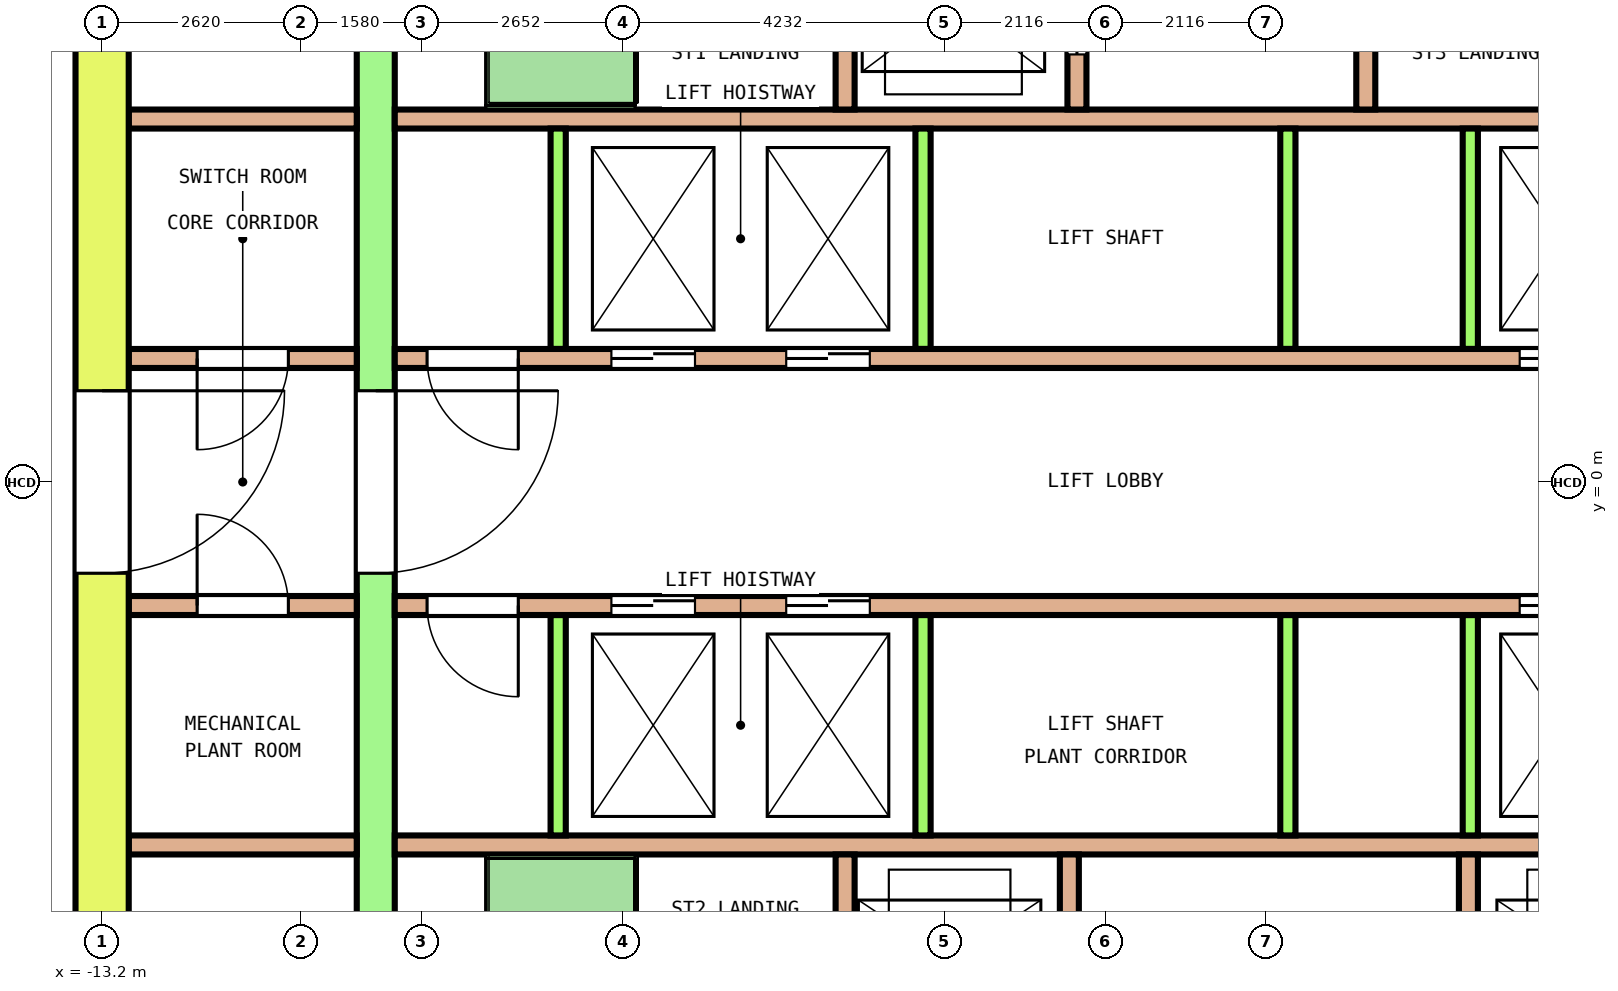
"""IFC4 building model, lengths in metres.
Left out: names, types, materials, properties, quantities, classifications, styles, units other than length and angle.
Written with IfcOpenShell. Run it as: python <this file> out.ifc"""

import sys

from ifc_helpers import new_model, si_unit, direction, frame, frame_2d, origin, place, context, subcontext, project, spatial, rectangle, extrude, element, fill, save


model = new_model("IFC4")
c1 = context("Model", 3, precision=1e-05, world=origin(), true_north=direction((0.0, 1.0)))
c2 = subcontext(c1, "Body", "Model", "MODEL_VIEW")
j1 = project(units=[si_unit("LENGTHUNIT", "METRE"), si_unit("PLANEANGLEUNIT", "RADIAN")], contexts=[c1])
p1 = place(None, origin())
s1 = spatial("IfcSite", under=j1, at=p1, CompositionType="ELEMENT")
p2 = place(p1, origin())
s2 = spatial("IfcBuilding", under=s1, at=p2, CompositionType="ELEMENT")
p3 = place(p2, frame((0.0, 0.0, 139.6)))
s3 = spatial("IfcBuildingStorey", under=s2, at=p3, CompositionType="ELEMENT", Elevation=139.6)
p4 = place(p3, frame((-13.2, -7.75, 0.0), z_axis=(0.0, 0.0, 1.0), x_axis=(0.0, 1.0, 0.0)))
e1 = element("IfcWall", 1, at=p4, inside=s3, PredefinedType="SHEAR", context=c2, shape_type="SweptSolid", body=[
    extrude(rectangle(XDim=15.5, YDim=0.7, at=frame_2d((7.75, 0.0))), origin(), (0.0, 0.0, 1.0), 5.3),
])
p5 = place(p4, frame((6.55, 0.0, 0.0)))
e2 = element("IfcOpeningElement", 2, at=p5, cuts=e1, PredefinedType="OPENING", context=c2, shape_type="SweptSolid", body=[
    extrude(rectangle(XDim=2.4, YDim=2.1, at=frame_2d((1.2, 1.05))), frame((0.0, 0.36, 0.0), z_axis=(0.0, -1.0, 0.0), x_axis=(1.0, 0.0, 0.0)), (0.0, 0.0, 1.0), 0.72),
])
p6 = place(p4, frame((13.45, 0.0, 0.0)))
e3 = element("IfcOpeningElement", 3, at=p6, cuts=e1, PredefinedType="OPENING", context=c2, shape_type="SweptSolid", body=[
    extrude(rectangle(XDim=1.2, YDim=2.1, at=frame_2d((0.6, 1.05))), frame((0.0, 0.36, 0.0), z_axis=(0.0, -1.0, 0.0), x_axis=(1.0, 0.0, 0.0)), (0.0, 0.0, 1.0), 0.72),
])
p7 = place(p4, frame((0.85, 0.0, 0.0)))
e4 = element("IfcOpeningElement", 4, at=p7, cuts=e1, PredefinedType="OPENING", context=c2, shape_type="SweptSolid", body=[
    extrude(rectangle(XDim=1.2, YDim=2.1, at=frame_2d((0.6, 1.05))), frame((0.0, 0.36, 0.0), z_axis=(0.0, -1.0, 0.0), x_axis=(1.0, 0.0, 0.0)), (0.0, 0.0, 1.0), 0.72),
])
p8 = place(p3, frame((-9.6, -7.75, 0.0), z_axis=(0.0, 0.0, 1.0), x_axis=(0.0, 1.0, 0.0)))
e5 = element("IfcWall", 5, at=p8, inside=s3, PredefinedType="SHEAR", context=c2, shape_type="SweptSolid", body=[
    extrude(rectangle(XDim=15.5, YDim=0.5, at=frame_2d((7.75, 0.0))), origin(), (0.0, 0.0, 1.0), 5.3),
])
p9 = place(p8, frame((6.55, 0.0, 0.0)))
e6 = element("IfcOpeningElement", 6, at=p9, cuts=e5, PredefinedType="OPENING", context=c2, shape_type="SweptSolid", body=[
    extrude(rectangle(XDim=2.4, YDim=2.1, at=frame_2d((1.2, 1.05))), frame((0.0, 0.26, 0.0), z_axis=(0.0, -1.0, 0.0), x_axis=(1.0, 0.0, 0.0)), (0.0, 0.0, 1.0), 0.52),
])
p10 = place(p8, frame((13.45, 0.0, 0.0)))
e7 = element("IfcOpeningElement", 7, at=p10, cuts=e5, PredefinedType="OPENING", context=c2, shape_type="SweptSolid", body=[
    extrude(rectangle(XDim=1.2, YDim=2.1, at=frame_2d((0.6, 1.05))), frame((0.0, 0.26, 0.0), z_axis=(0.0, -1.0, 0.0), x_axis=(1.0, 0.0, 0.0)), (0.0, 0.0, 1.0), 0.52),
])
p11 = place(p8, frame((0.85, 0.0, 0.0)))
e8 = element("IfcOpeningElement", 8, at=p11, cuts=e5, PredefinedType="OPENING", context=c2, shape_type="SweptSolid", body=[
    extrude(rectangle(XDim=1.2, YDim=2.1, at=frame_2d((0.6, 1.05))), frame((0.0, 0.26, 0.0), z_axis=(0.0, -1.0, 0.0), x_axis=(1.0, 0.0, 0.0)), (0.0, 0.0, 1.0), 0.52),
])
p12 = place(p3, frame((-12.85, 1.625, 0.0), z_axis=(0.0, 0.0, 1.0), x_axis=(1.0, 0.0, 0.0)))
e9 = element("IfcWall", 9, at=p12, inside=s3, PredefinedType="SOLIDWALL", context=c2, shape_type="SweptSolid", body=[
    extrude(rectangle(XDim=3.0, YDim=0.25, at=frame_2d((1.5, 0.0))), origin(), (0.0, 0.0, 1.0), 5.3),
])
p13 = place(p12, frame((0.9, 0.0, 0.0)))
e10 = element("IfcOpeningElement", 10, at=p13, cuts=e9, PredefinedType="OPENING", context=c2, shape_type="SweptSolid", body=[
    extrude(rectangle(XDim=1.2, YDim=2.1, at=frame_2d((0.6, 1.05))), frame((0.0, 0.135, 0.0), z_axis=(0.0, -1.0, 0.0), x_axis=(1.0, 0.0, 0.0)), (0.0, 0.0, 1.0), 0.27),
])
p14 = place(p3, frame((-9.35, 1.625, 0.0), z_axis=(0.0, 0.0, 1.0), x_axis=(1.0, 0.0, 0.0)))
e11 = element("IfcWall", 11, at=p14, inside=s3, PredefinedType="SOLIDWALL", context=c2, shape_type="SweptSolid", body=[
    extrude(rectangle(XDim=18.7, YDim=0.25, at=frame_2d((9.35, 0.0))), origin(), (0.0, 0.0, 1.0), 5.3),
])
p15 = place(p14, frame((2.85, 0.0, 0.0)))
e12 = element("IfcOpeningElement", 12, at=p15, cuts=e11, PredefinedType="OPENING", context=c2, shape_type="SweptSolid", body=[
    extrude(rectangle(XDim=1.1, YDim=2.1, at=frame_2d((0.55, 1.05))), frame((0.0, 0.135, 0.0), z_axis=(0.0, -1.0, 0.0), x_axis=(1.0, 0.0, 0.0)), (0.0, 0.0, 1.0), 0.27),
])
p16 = place(p14, frame((5.15, 0.0, 0.0)))
e13 = element("IfcOpeningElement", 13, at=p16, cuts=e11, PredefinedType="OPENING", context=c2, shape_type="SweptSolid", body=[
    extrude(rectangle(XDim=1.1, YDim=2.1, at=frame_2d((0.55, 1.05))), frame((0.0, 0.135, 0.0), z_axis=(0.0, -1.0, 0.0), x_axis=(1.0, 0.0, 0.0)), (0.0, 0.0, 1.0), 0.27),
])
p17 = place(p14, frame((14.8, 0.0, 0.0)))
e14 = element("IfcOpeningElement", 14, at=p17, cuts=e11, PredefinedType="OPENING", context=c2, shape_type="SweptSolid", body=[
    extrude(rectangle(XDim=1.1, YDim=2.1, at=frame_2d((0.55, 1.05))), frame((0.0, 0.135, 0.0), z_axis=(0.0, -1.0, 0.0), x_axis=(1.0, 0.0, 0.0)), (0.0, 0.0, 1.0), 0.27),
])
p18 = place(p14, frame((0.425, 0.0, 0.0)))
e15 = element("IfcOpeningElement", 15, at=p18, cuts=e11, PredefinedType="OPENING", context=c2, shape_type="SweptSolid", body=[
    extrude(rectangle(XDim=1.2, YDim=2.1, at=frame_2d((0.6, 1.05))), frame((0.0, 0.135, 0.0), z_axis=(0.0, -1.0, 0.0), x_axis=(1.0, 0.0, 0.0)), (0.0, 0.0, 1.0), 0.27),
])
p19 = place(p14, frame((17.075, 0.0, 0.0)))
e16 = element("IfcOpeningElement", 16, at=p19, cuts=e11, PredefinedType="OPENING", context=c2, shape_type="SweptSolid", body=[
    extrude(rectangle(XDim=1.2, YDim=2.1, at=frame_2d((0.6, 1.05))), frame((0.0, 0.135, 0.0), z_axis=(0.0, -1.0, 0.0), x_axis=(1.0, 0.0, 0.0)), (0.0, 0.0, 1.0), 0.27),
])
p20 = place(p3, frame((-12.85, 4.775, 0.0), z_axis=(0.0, 0.0, 1.0), x_axis=(1.0, 0.0, 0.0)))
e17 = element("IfcWall", 17, at=p20, inside=s3, PredefinedType="SOLIDWALL", context=c2, shape_type="SweptSolid", body=[
    extrude(rectangle(XDim=3.0, YDim=0.25, at=frame_2d((1.5, 0.0))), origin(), (0.0, 0.0, 1.0), 5.3),
])
p21 = place(p3, frame((-9.35, 4.775, 0.0), z_axis=(0.0, 0.0, 1.0), x_axis=(1.0, 0.0, 0.0)))
e18 = element("IfcWall", 18, at=p21, inside=s3, PredefinedType="SOLIDWALL", context=c2, shape_type="SweptSolid", body=[
    extrude(rectangle(XDim=18.7, YDim=0.25, at=frame_2d((9.35, 0.0))), origin(), (0.0, 0.0, 1.0), 5.3),
])
for number, where, z_axis, x_axis in (
    (19, (-7.2, 1.75, 0.0), (0.0, 0.0, 1.0), (0.0, 1.0, 0.0)),
    (20, (-2.4, 1.75, 0.0), (0.0, 0.0, 1.0), (0.0, 1.0, 0.0)),
    (21, (2.4, 1.75, 0.0), (0.0, 0.0, 1.0), (0.0, 1.0, 0.0)),
    (22, (4.8, 1.75, 0.0), (0.0, 0.0, 1.0), (0.0, 1.0, 0.0)),
):
    element("IfcWall", number, at=place(p3, frame(where, z_axis=z_axis, x_axis=x_axis)), inside=s3, PredefinedType="SOLIDWALL", context=c2, shape_type="SweptSolid", body=[
        extrude(rectangle(XDim=2.9, YDim=0.2, at=frame_2d((1.45, 0.0))), origin(), (0.0, 0.0, 1.0), 5.3),
    ])
p22 = place(p3, frame((-12.85, -1.625, 0.0), z_axis=(0.0, 0.0, 1.0), x_axis=(1.0, 0.0, 0.0)))
e23 = element("IfcWall", 23, at=p22, inside=s3, PredefinedType="SOLIDWALL", context=c2, shape_type="SweptSolid", body=[
    extrude(rectangle(XDim=3.0, YDim=0.25, at=frame_2d((1.5, 0.0))), origin(), (0.0, 0.0, 1.0), 5.3),
])
p23 = place(p22, frame((0.9, 0.0, 0.0)))
e24 = element("IfcOpeningElement", 24, at=p23, cuts=e23, PredefinedType="OPENING", context=c2, shape_type="SweptSolid", body=[
    extrude(rectangle(XDim=1.2, YDim=2.1, at=frame_2d((0.6, 1.05))), frame((0.0, 0.135, 0.0), z_axis=(0.0, -1.0, 0.0), x_axis=(1.0, 0.0, 0.0)), (0.0, 0.0, 1.0), 0.27),
])
p24 = place(p3, frame((-9.35, -1.625, 0.0), z_axis=(0.0, 0.0, 1.0), x_axis=(1.0, 0.0, 0.0)))
e25 = element("IfcWall", 25, at=p24, inside=s3, PredefinedType="SOLIDWALL", context=c2, shape_type="SweptSolid", body=[
    extrude(rectangle(XDim=18.7, YDim=0.25, at=frame_2d((9.35, 0.0))), origin(), (0.0, 0.0, 1.0), 5.3),
])
p25 = place(p24, frame((2.85, 0.0, 0.0)))
e26 = element("IfcOpeningElement", 26, at=p25, cuts=e25, PredefinedType="OPENING", context=c2, shape_type="SweptSolid", body=[
    extrude(rectangle(XDim=1.1, YDim=2.1, at=frame_2d((0.55, 1.05))), frame((0.0, 0.135, 0.0), z_axis=(0.0, -1.0, 0.0), x_axis=(1.0, 0.0, 0.0)), (0.0, 0.0, 1.0), 0.27),
])
p26 = place(p24, frame((5.15, 0.0, 0.0)))
e27 = element("IfcOpeningElement", 27, at=p26, cuts=e25, PredefinedType="OPENING", context=c2, shape_type="SweptSolid", body=[
    extrude(rectangle(XDim=1.1, YDim=2.1, at=frame_2d((0.55, 1.05))), frame((0.0, 0.135, 0.0), z_axis=(0.0, -1.0, 0.0), x_axis=(1.0, 0.0, 0.0)), (0.0, 0.0, 1.0), 0.27),
])
p27 = place(p24, frame((14.8, 0.0, 0.0)))
e28 = element("IfcOpeningElement", 28, at=p27, cuts=e25, PredefinedType="OPENING", context=c2, shape_type="SweptSolid", body=[
    extrude(rectangle(XDim=1.1, YDim=2.1, at=frame_2d((0.55, 1.05))), frame((0.0, 0.135, 0.0), z_axis=(0.0, -1.0, 0.0), x_axis=(1.0, 0.0, 0.0)), (0.0, 0.0, 1.0), 0.27),
])
p28 = place(p24, frame((0.425, 0.0, 0.0)))
e29 = element("IfcOpeningElement", 29, at=p28, cuts=e25, PredefinedType="OPENING", context=c2, shape_type="SweptSolid", body=[
    extrude(rectangle(XDim=1.2, YDim=2.1, at=frame_2d((0.6, 1.05))), frame((0.0, 0.135, 0.0), z_axis=(0.0, -1.0, 0.0), x_axis=(1.0, 0.0, 0.0)), (0.0, 0.0, 1.0), 0.27),
])
p29 = place(p24, frame((17.075, 0.0, 0.0)))
e30 = element("IfcOpeningElement", 30, at=p29, cuts=e25, PredefinedType="OPENING", context=c2, shape_type="SweptSolid", body=[
    extrude(rectangle(XDim=1.2, YDim=2.1, at=frame_2d((0.6, 1.05))), frame((0.0, 0.135, 0.0), z_axis=(0.0, -1.0, 0.0), x_axis=(1.0, 0.0, 0.0)), (0.0, 0.0, 1.0), 0.27),
])
p30 = place(p3, frame((-12.85, -4.775, 0.0), z_axis=(0.0, 0.0, 1.0), x_axis=(1.0, 0.0, 0.0)))
e31 = element("IfcWall", 31, at=p30, inside=s3, PredefinedType="SOLIDWALL", context=c2, shape_type="SweptSolid", body=[
    extrude(rectangle(XDim=3.0, YDim=0.25, at=frame_2d((1.5, 0.0))), origin(), (0.0, 0.0, 1.0), 5.3),
])
p31 = place(p3, frame((-9.35, -4.775, 0.0), z_axis=(0.0, 0.0, 1.0), x_axis=(1.0, 0.0, 0.0)))
e32 = element("IfcWall", 32, at=p31, inside=s3, PredefinedType="SOLIDWALL", context=c2, shape_type="SweptSolid", body=[
    extrude(rectangle(XDim=18.7, YDim=0.25, at=frame_2d((9.35, 0.0))), origin(), (0.0, 0.0, 1.0), 5.3),
])
for number, where, z_axis, x_axis in (
    (33, (-7.2, -4.65, 0.0), (0.0, 0.0, 1.0), (0.0, 1.0, 0.0)),
    (34, (-2.4, -4.65, 0.0), (0.0, 0.0, 1.0), (0.0, 1.0, 0.0)),
    (35, (2.4, -4.65, 0.0), (0.0, 0.0, 1.0), (0.0, 1.0, 0.0)),
    (36, (4.8, -4.65, 0.0), (0.0, 0.0, 1.0), (0.0, 1.0, 0.0)),
):
    element("IfcWall", number, at=place(p3, frame(where, z_axis=z_axis, x_axis=x_axis)), inside=s3, PredefinedType="SOLIDWALL", context=c2, shape_type="SweptSolid", body=[
        extrude(rectangle(XDim=2.9, YDim=0.2, at=frame_2d((1.45, 0.0))), origin(), (0.0, 0.0, 1.0), 5.3),
    ])
p32 = place(p3, frame((-3.425, 4.9, 0.0), z_axis=(0.0, 0.0, 1.0), x_axis=(0.0, 1.0, 0.0)))
e37 = element("IfcWall", 37, at=p32, inside=s3, PredefinedType="SOLIDWALL", context=c2, shape_type="SweptSolid", body=[
    extrude(rectangle(XDim=2.85, YDim=0.25, at=frame_2d((1.425, 0.0))), origin(), (0.0, 0.0, 1.0), 5.3),
])
p33 = place(p3, frame((-0.375, 4.9, 0.0), z_axis=(0.0, 0.0, 1.0), x_axis=(0.0, 1.0, 0.0)))
e38 = element("IfcWall", 38, at=p33, inside=s3, PredefinedType="SOLIDWALL", context=c2, shape_type="SweptSolid", body=[
    extrude(rectangle(XDim=2.85, YDim=0.25, at=frame_2d((1.425, 0.0))), origin(), (0.0, 0.0, 1.0), 5.3),
])
p34 = place(p33, frame((0.725, 0.0, 0.0)))
e39 = element("IfcOpeningElement", 39, at=p34, cuts=e38, PredefinedType="OPENING", context=c2, shape_type="SweptSolid", body=[
    extrude(rectangle(XDim=1.4, YDim=2.1, at=frame_2d((0.7, 1.05))), frame((0.0, 0.135, 0.0), z_axis=(0.0, -1.0, 0.0), x_axis=(1.0, 0.0, 0.0)), (0.0, 0.0, 1.0), 0.27),
])
for number, where, z_axis, x_axis in (
    (40, (3.425, 4.9, 0.0), (0.0, 0.0, 1.0), (0.0, 1.0, 0.0)),
    (41, (-3.425, -7.75, 0.0), (0.0, 0.0, 1.0), (0.0, 1.0, 0.0)),
):
    element("IfcWall", number, at=place(p3, frame(where, z_axis=z_axis, x_axis=x_axis)), inside=s3, PredefinedType="SOLIDWALL", context=c2, shape_type="SweptSolid", body=[
        extrude(rectangle(XDim=2.85, YDim=0.25, at=frame_2d((1.425, 0.0))), origin(), (0.0, 0.0, 1.0), 5.3),
    ])
p35 = place(p3, frame((-0.475, -7.75, 0.0), z_axis=(0.0, 0.0, 1.0), x_axis=(0.0, 1.0, 0.0)))
e42 = element("IfcWall", 42, at=p35, inside=s3, PredefinedType="SOLIDWALL", context=c2, shape_type="SweptSolid", body=[
    extrude(rectangle(XDim=2.85, YDim=0.25, at=frame_2d((1.425, 0.0))), origin(), (0.0, 0.0, 1.0), 5.3),
])
p36 = place(p35, frame((0.875, 0.0, 0.0)))
e43 = element("IfcOpeningElement", 43, at=p36, cuts=e42, PredefinedType="OPENING", context=c2, shape_type="SweptSolid", body=[
    extrude(rectangle(XDim=1.1, YDim=2.1, at=frame_2d((0.55, 1.05))), frame((0.0, 0.135, 0.0), z_axis=(0.0, -1.0, 0.0), x_axis=(1.0, 0.0, 0.0)), (0.0, 0.0, 1.0), 0.27),
])
p37 = place(p3, frame((4.775, -7.75, 0.0), z_axis=(0.0, 0.0, 1.0), x_axis=(0.0, 1.0, 0.0)))
e44 = element("IfcWall", 44, at=p37, inside=s3, PredefinedType="SOLIDWALL", context=c2, shape_type="SweptSolid", body=[
    extrude(rectangle(XDim=2.85, YDim=0.25, at=frame_2d((1.425, 0.0))), origin(), (0.0, 0.0, 1.0), 5.3),
])
p38 = place(p37, frame((0.875, 0.0, 0.0)))
e45 = element("IfcOpeningElement", 45, at=p38, cuts=e44, PredefinedType="OPENING", context=c2, shape_type="SweptSolid", body=[
    extrude(rectangle(XDim=1.1, YDim=2.1, at=frame_2d((0.55, 1.05))), frame((0.0, 0.135, 0.0), z_axis=(0.0, -1.0, 0.0), x_axis=(1.0, 0.0, 0.0)), (0.0, 0.0, 1.0), 0.27),
])
p39 = place(p15, origin())
e46 = element("IfcDoor", 46, at=p39, inside=s3, OperationType="DOUBLE_DOOR_SLIDING", PredefinedType="DOOR", context=c2, shape_type="SweptSolid", body=[
    extrude(rectangle(XDim=1.1, YDim=2.1, at=frame_2d((0.55, 1.05))), frame((0.0, 0.075, 0.0), z_axis=(0.0, -1.0, 0.0), x_axis=(1.0, 0.0, 0.0)), (0.0, 0.0, 1.0), 0.15),
])
fill(e12, e46)
p40 = place(p16, origin())
e47 = element("IfcDoor", 47, at=p40, inside=s3, OperationType="DOUBLE_DOOR_SLIDING", PredefinedType="DOOR", context=c2, shape_type="SweptSolid", body=[
    extrude(rectangle(XDim=1.1, YDim=2.1, at=frame_2d((0.55, 1.05))), frame((0.0, 0.075, 0.0), z_axis=(0.0, -1.0, 0.0), x_axis=(1.0, 0.0, 0.0)), (0.0, 0.0, 1.0), 0.15),
])
fill(e13, e47)
p41 = place(p17, origin())
e48 = element("IfcDoor", 48, at=p41, inside=s3, OperationType="DOUBLE_DOOR_SLIDING", PredefinedType="DOOR", context=c2, shape_type="SweptSolid", body=[
    extrude(rectangle(XDim=1.1, YDim=2.1, at=frame_2d((0.55, 1.05))), frame((0.0, 0.075, 0.0), z_axis=(0.0, -1.0, 0.0), x_axis=(1.0, 0.0, 0.0)), (0.0, 0.0, 1.0), 0.15),
])
fill(e14, e48)
p42 = place(p25, origin())
e49 = element("IfcDoor", 49, at=p42, inside=s3, OperationType="DOUBLE_DOOR_SLIDING", PredefinedType="DOOR", context=c2, shape_type="SweptSolid", body=[
    extrude(rectangle(XDim=1.1, YDim=2.1, at=frame_2d((0.55, 1.05))), frame((0.0, 0.075, 0.0), z_axis=(0.0, -1.0, 0.0), x_axis=(1.0, 0.0, 0.0)), (0.0, 0.0, 1.0), 0.15),
])
fill(e26, e49)
p43 = place(p26, origin())
e50 = element("IfcDoor", 50, at=p43, inside=s3, OperationType="DOUBLE_DOOR_SLIDING", PredefinedType="DOOR", context=c2, shape_type="SweptSolid", body=[
    extrude(rectangle(XDim=1.1, YDim=2.1, at=frame_2d((0.55, 1.05))), frame((0.0, 0.075, 0.0), z_axis=(0.0, -1.0, 0.0), x_axis=(1.0, 0.0, 0.0)), (0.0, 0.0, 1.0), 0.15),
])
fill(e27, e50)
p44 = place(p27, origin())
e51 = element("IfcDoor", 51, at=p44, inside=s3, OperationType="DOUBLE_DOOR_SLIDING", PredefinedType="DOOR", context=c2, shape_type="SweptSolid", body=[
    extrude(rectangle(XDim=1.1, YDim=2.1, at=frame_2d((0.55, 1.05))), frame((0.0, 0.075, 0.0), z_axis=(0.0, -1.0, 0.0), x_axis=(1.0, 0.0, 0.0)), (0.0, 0.0, 1.0), 0.15),
])
fill(e28, e51)
p45 = place(p34, origin())
e52 = element("IfcDoor", 52, at=p45, inside=s3, OperationType="DOUBLE_DOOR_SLIDING", PredefinedType="DOOR", context=c2, shape_type="SweptSolid", body=[
    extrude(rectangle(XDim=1.4, YDim=2.1, at=frame_2d((0.7, 1.05))), frame((0.0, 0.075, 0.0), z_axis=(0.0, -1.0, 0.0), x_axis=(1.0, 0.0, 0.0)), (0.0, 0.0, 1.0), 0.15),
])
fill(e39, e52)
p46 = place(p9, origin())
e53 = element("IfcDoor", 53, at=p46, inside=s3, OperationType="DOUBLE_DOOR_SINGLE_SWING", PredefinedType="DOOR", context=c2, shape_type="SweptSolid", body=[
    extrude(rectangle(XDim=2.4, YDim=2.1, at=frame_2d((1.2, 1.05))), frame((0.0, 0.2, 0.0), z_axis=(0.0, -1.0, 0.0), x_axis=(1.0, 0.0, 0.0)), (0.0, 0.0, 1.0), 0.4),
])
fill(e6, e53)
p47 = place(p5, origin())
e54 = element("IfcDoor", 54, at=p47, inside=s3, OperationType="DOUBLE_DOOR_SINGLE_SWING", PredefinedType="DOOR", context=c2, shape_type="SweptSolid", body=[
    extrude(rectangle(XDim=2.4, YDim=2.1, at=frame_2d((1.2, 1.05))), frame((0.0, 0.3, 0.0), z_axis=(0.0, -1.0, 0.0), x_axis=(1.0, 0.0, 0.0)), (0.0, 0.0, 1.0), 0.6),
])
fill(e2, e54)
p48 = place(p13, origin())
e55 = element("IfcDoor", 55, at=p48, inside=s3, OperationType="SINGLE_SWING_RIGHT", PredefinedType="DOOR", context=c2, shape_type="SweptSolid", body=[
    extrude(rectangle(XDim=1.2, YDim=2.1, at=frame_2d((0.6, 1.05))), frame((0.0, 0.075, 0.0), z_axis=(0.0, -1.0, 0.0), x_axis=(1.0, 0.0, 0.0)), (0.0, 0.0, 1.0), 0.15),
])
fill(e10, e55)
p49 = place(p18, origin())
e56 = element("IfcDoor", 56, at=p49, inside=s3, OperationType="SINGLE_SWING_LEFT", PredefinedType="DOOR", context=c2, shape_type="SweptSolid", body=[
    extrude(rectangle(XDim=1.2, YDim=2.1, at=frame_2d((0.6, 1.05))), frame((0.0, 0.075, 0.0), z_axis=(0.0, -1.0, 0.0), x_axis=(1.0, 0.0, 0.0)), (0.0, 0.0, 1.0), 0.15),
])
fill(e15, e56)
p50 = place(p23, origin())
e57 = element("IfcDoor", 57, at=p50, inside=s3, OperationType="SINGLE_SWING_RIGHT", PredefinedType="DOOR", context=c2, shape_type="SweptSolid", body=[
    extrude(rectangle(XDim=1.2, YDim=2.1, at=frame_2d((0.6, 1.05))), frame((0.0, 0.075, 0.0), z_axis=(0.0, -1.0, 0.0), x_axis=(1.0, 0.0, 0.0)), (0.0, 0.0, 1.0), 0.15),
])
fill(e24, e57)
p51 = place(p28, origin())
e58 = element("IfcDoor", 58, at=p51, inside=s3, OperationType="SINGLE_SWING_LEFT", PredefinedType="DOOR", context=c2, shape_type="SweptSolid", body=[
    extrude(rectangle(XDim=1.2, YDim=2.1, at=frame_2d((0.6, 1.05))), frame((0.0, 0.075, 0.0), z_axis=(0.0, -1.0, 0.0), x_axis=(1.0, 0.0, 0.0)), (0.0, 0.0, 1.0), 0.15),
])
fill(e29, e58)
save(model, sys.argv[1])
